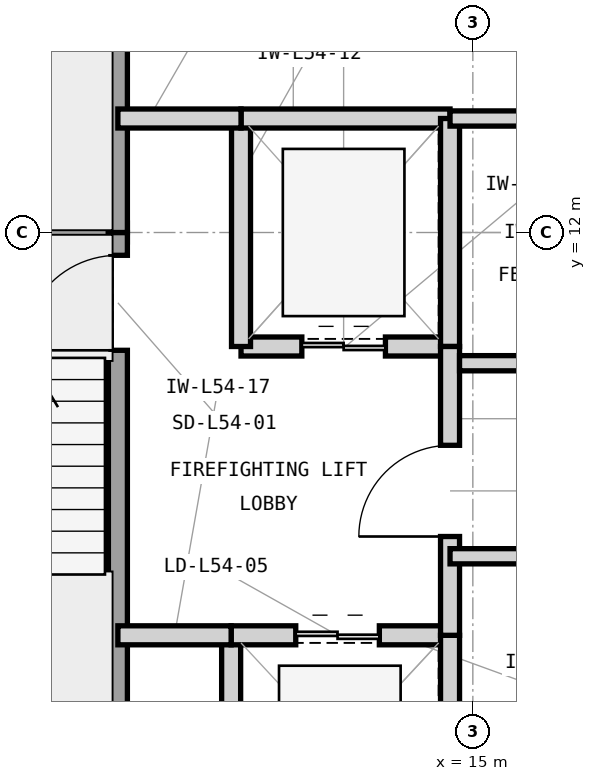
"""IFC4 building model, lengths in metres.
Left out: names, types, materials, properties, quantities, classifications, styles, units other than length and angle.
Written with IfcOpenShell. Run it as: python <this file> out.ifc"""

import sys

from ifc_helpers import new_model, si_unit, direction, frame, frame_2d, origin, place, context, subcontext, project, spatial, rectangle, extrude, element, fill, save


model = new_model("IFC4")
c1 = context("Model", 3, precision=1e-05, world=origin(), true_north=direction((0.0, 1.0)))
c2 = subcontext(c1, "Body", "Model", "MODEL_VIEW")
j1 = project(units=[si_unit("LENGTHUNIT", "METRE"), si_unit("PLANEANGLEUNIT", "RADIAN")], contexts=[c1])
p1 = place(None, origin())
s1 = spatial("IfcSite", under=j1, at=p1, CompositionType="ELEMENT")
p2 = place(p1, origin())
s2 = spatial("IfcBuilding", under=s1, at=p2, CompositionType="ELEMENT")
p3 = place(p2, frame((0.0, 0.0, 222.9)))
s3 = spatial("IfcBuildingStorey", under=s2, at=p3, CompositionType="ELEMENT", Elevation=222.9)
p4 = place(p3, frame((6.35, 12.0, 0.0), z_axis=(0.0, 0.0, 1.0), x_axis=(1.0, 0.0, 0.0)))
e1 = element("IfcWall", 1, at=p4, inside=s3, PredefinedType="SHEAR", context=c2, shape_type="SweptSolid", body=[
    extrude(rectangle(XDim=4.105, YDim=0.25, at=frame_2d((2.052, 0.0))), origin(), (0.0, 0.0, 1.0), 3.9),
])
p5 = place(p3, frame((10.33, 4.55, 0.0), z_axis=(0.0, 0.0, 1.0), x_axis=(0.0, 1.0, 0.0)))
e2 = element("IfcWall", 2, at=p5, inside=s3, PredefinedType="SHEAR", context=c2, shape_type="SweptSolid", body=[
    extrude(rectangle(XDim=7.45, YDim=0.25, at=frame_2d((3.725, 0.0))), origin(), (0.0, 0.0, 1.0), 3.9),
])
p6 = place(p5, frame((5.9, 0.0, 0.0)))
e3 = element("IfcOpeningElement", 3, at=p6, cuts=e2, PredefinedType="OPENING", context=c2, shape_type="SweptSolid", body=[
    extrude(rectangle(XDim=1.25, YDim=2.2, at=frame_2d((0.625, 1.1))), frame((0.0, 0.135, 0.0), z_axis=(0.0, -1.0, 0.0), x_axis=(1.0, 0.0, 0.0)), (0.0, 0.0, 1.0), 0.27),
])
p7 = place(p3, frame((10.33, 12.0, 0.0), z_axis=(0.0, 0.0, 1.0), x_axis=(0.0, 1.0, 0.0)))
e4 = element("IfcWall", 4, at=p7, inside=s3, PredefinedType="SHEAR", context=c2, shape_type="SweptSolid", body=[
    extrude(rectangle(XDim=7.45, YDim=0.25, at=frame_2d((3.725, 0.0))), origin(), (0.0, 0.0, 1.0), 3.9),
])
p8 = place(p7, frame((5.85, 0.0, 0.0)))
e5 = element("IfcOpeningElement", 5, at=p8, cuts=e4, PredefinedType="OPENING", context=c2, shape_type="SweptSolid", body=[
    extrude(rectangle(XDim=1.25, YDim=2.2, at=frame_2d((0.625, 1.1))), frame((0.0, 0.135, 0.0), z_axis=(0.0, -1.0, 0.0), x_axis=(1.0, 0.0, 0.0)), (0.0, 0.0, 1.0), 0.27),
])
p9 = place(p3, frame((11.82, 3.35, 0.0), z_axis=(0.0, 0.0, 1.0), x_axis=(0.0, 1.0, 0.0)))
e6 = element("IfcWall", 6, at=p9, inside=s3, PredefinedType="PARTITIONING", context=c2, shape_type="SweptSolid", body=[
    extrude(rectangle(XDim=3.35, YDim=0.25, at=frame_2d((1.675, 0.0))), origin(), (0.0, 0.0, 1.0), 3.61),
])
p10 = place(p3, frame((11.82, 6.7, 0.0), z_axis=(0.0, 0.0, 1.0), x_axis=(1.0, 0.0, 0.0)))
e7 = element("IfcWall", 7, at=p10, inside=s3, PredefinedType="PARTITIONING", context=c2, shape_type="SweptSolid", body=[
    extrude(rectangle(XDim=2.88, YDim=0.25, at=frame_2d((1.44, 0.0))), origin(), (0.0, 0.0, 1.0), 3.073),
])
p11 = place(p10, frame((0.85, 0.0, 0.0)))
e8 = element("IfcOpeningElement", 8, at=p11, cuts=e7, PredefinedType="OPENING", context=c2, shape_type="SweptSolid", body=[
    extrude(rectangle(XDim=1.1, YDim=2.25, at=frame_2d((0.55, 1.125))), frame((0.0, 0.135, 0.0), z_axis=(0.0, -1.0, 0.0), x_axis=(1.0, 0.0, 0.0)), (0.0, 0.0, 1.0), 0.27),
])
p12 = place(p3, frame((14.7, 3.35, 0.0), z_axis=(0.0, 0.0, 1.0), x_axis=(0.0, 1.0, 0.0)))
e9 = element("IfcWall", 9, at=p12, inside=s3, PredefinedType="PARTITIONING", context=c2, shape_type="SweptSolid", body=[
    extrude(rectangle(XDim=3.35, YDim=0.25, at=frame_2d((1.675, 0.0))), origin(), (0.0, 0.0, 1.0), 3.61),
])
p13 = place(p3, frame((11.95, 10.5, 0.0), z_axis=(0.0, 0.0, 1.0), x_axis=(1.0, 0.0, 0.0)))
e10 = element("IfcWall", 10, at=p13, inside=s3, PredefinedType="PARTITIONING", context=c2, shape_type="SweptSolid", body=[
    extrude(rectangle(XDim=2.75, YDim=0.25, at=frame_2d((1.375, 0.0))), origin(), (0.0, 0.0, 1.0), 3.073),
])
p14 = place(p13, frame((0.8, 0.0, 0.0)))
e11 = element("IfcOpeningElement", 11, at=p14, cuts=e10, PredefinedType="OPENING", context=c2, shape_type="SweptSolid", body=[
    extrude(rectangle(XDim=1.1, YDim=2.25, at=frame_2d((0.55, 1.125))), frame((0.0, 0.135, 0.0), z_axis=(0.0, -1.0, 0.0), x_axis=(1.0, 0.0, 0.0)), (0.0, 0.0, 1.0), 0.27),
])
p15 = place(p3, frame((11.95, 10.5, 0.0), z_axis=(0.0, 0.0, 1.0), x_axis=(0.0, 1.0, 0.0)))
e12 = element("IfcWall", 12, at=p15, inside=s3, PredefinedType="PARTITIONING", context=c2, shape_type="SweptSolid", body=[
    extrude(rectangle(XDim=3.0, YDim=0.25, at=frame_2d((1.5, 0.0))), origin(), (0.0, 0.0, 1.0), 3.61),
])
p16 = place(p3, frame((11.95, 13.5, 0.0), z_axis=(0.0, 0.0, 1.0), x_axis=(1.0, 0.0, 0.0)))
e13 = element("IfcWall", 13, at=p16, inside=s3, PredefinedType="PARTITIONING", context=c2, shape_type="SweptSolid", body=[
    extrude(rectangle(XDim=2.75, YDim=0.25, at=frame_2d((1.375, 0.0))), origin(), (0.0, 0.0, 1.0), 3.073),
])
p17 = place(p3, frame((14.7, 10.5, 0.0), z_axis=(0.0, 0.0, 1.0), x_axis=(0.0, 1.0, 0.0)))
e14 = element("IfcWall", 14, at=p17, inside=s3, PredefinedType="PARTITIONING", context=c2, shape_type="SweptSolid", body=[
    extrude(rectangle(XDim=3.0, YDim=0.25, at=frame_2d((1.5, 0.0))), origin(), (0.0, 0.0, 1.0), 3.61),
])
p18 = place(p3, frame((14.7, 6.7, 0.0), z_axis=(0.0, 0.0, 1.0), x_axis=(0.0, 1.0, 0.0)))
e15 = element("IfcWall", 15, at=p18, inside=s3, PredefinedType="PARTITIONING", context=c2, shape_type="SweptSolid", body=[
    extrude(rectangle(XDim=3.8, YDim=0.25, at=frame_2d((1.9, 0.0))), origin(), (0.0, 0.0, 1.0), 3.61),
])
p19 = place(p18, frame((1.3, 0.0, 0.0)))
e16 = element("IfcOpeningElement", 16, at=p19, cuts=e15, PredefinedType="OPENING", context=c2, shape_type="SweptSolid", body=[
    extrude(rectangle(XDim=1.2, YDim=2.2, at=frame_2d((0.6, 1.1))), frame((0.0, 0.135, 0.0), z_axis=(0.0, -1.0, 0.0), x_axis=(1.0, 0.0, 0.0)), (0.0, 0.0, 1.0), 0.27),
])
p20 = place(p3, frame((10.33, 13.5, 0.0), z_axis=(0.0, 0.0, 1.0), x_axis=(1.0, 0.0, 0.0)))
e17 = element("IfcWall", 17, at=p20, inside=s3, PredefinedType="PARTITIONING", context=c2, shape_type="SweptSolid", body=[
    extrude(rectangle(XDim=1.62, YDim=0.25, at=frame_2d((0.81, 0.0))), origin(), (0.0, 0.0, 1.0), 3.073),
])
p21 = place(p3, frame((10.33, 6.7, 0.0), z_axis=(0.0, 0.0, 1.0), x_axis=(1.0, 0.0, 0.0)))
e18 = element("IfcWall", 18, at=p21, inside=s3, PredefinedType="PARTITIONING", context=c2, shape_type="SweptSolid", body=[
    extrude(rectangle(XDim=1.49, YDim=0.25, at=frame_2d((0.745, 0.0))), origin(), (0.0, 0.0, 1.0), 3.073),
])
p22 = place(p3, frame((14.7, 7.74, 0.0), z_axis=(0.0, 0.0, 1.0), x_axis=(1.0, 0.0, 0.0)))
e19 = element("IfcWall", 19, at=p22, inside=s3, PredefinedType="PARTITIONING", context=c2, shape_type="SweptSolid", body=[
    extrude(rectangle(XDim=2.95, YDim=0.2, at=frame_2d((1.475, 0.0))), origin(), (0.0, 0.0, 1.0), 3.61),
])
p23 = place(p22, frame((1.025, 0.0, 0.0)))
e20 = element("IfcOpeningElement", 20, at=p23, cuts=e19, PredefinedType="OPENING", context=c2, shape_type="SweptSolid", body=[
    extrude(rectangle(XDim=0.9, YDim=2.1, at=frame_2d((0.45, 1.05))), frame((0.0, 0.11, 0.0), z_axis=(0.0, -1.0, 0.0), x_axis=(1.0, 0.0, 0.0)), (0.0, 0.0, 1.0), 0.22),
])
p24 = place(p3, frame((14.825, 10.28, 0.0), z_axis=(0.0, 0.0, 1.0), x_axis=(1.0, 0.0, 0.0)))
e21 = element("IfcWall", 21, at=p24, inside=s3, PredefinedType="PARTITIONING", context=c2, shape_type="SweptSolid", body=[
    extrude(rectangle(XDim=8.825, YDim=0.2, at=frame_2d((4.413, 0.0))), origin(), (0.0, 0.0, 1.0), 3.61),
])
p25 = place(p3, frame((14.7, 13.5, 0.0), z_axis=(0.0, 0.0, 1.0), x_axis=(1.0, 0.0, 0.0)))
e22 = element("IfcWall", 22, at=p25, inside=s3, PredefinedType="PARTITIONING", context=c2, shape_type="SweptSolid", body=[
    extrude(rectangle(XDim=3.75, YDim=0.2, at=frame_2d((1.875, 0.0))), origin(), (0.0, 0.0, 1.0), 3.073),
])
p26 = place(p25, frame((1.4, 0.0, 0.0)))
e23 = element("IfcOpeningElement", 23, at=p26, cuts=e22, PredefinedType="OPENING", context=c2, shape_type="SweptSolid", body=[
    extrude(rectangle(XDim=0.95, YDim=2.1, at=frame_2d((0.475, 1.05))), frame((0.0, 0.11, 0.0), z_axis=(0.0, -1.0, 0.0), x_axis=(1.0, 0.0, 0.0)), (0.0, 0.0, 1.0), 0.22),
])
p27 = place(p6, origin())
e24 = element("IfcDoor", 24, at=p27, inside=s3, OperationType="SINGLE_SWING_LEFT", PredefinedType="DOOR", context=c2, shape_type="SweptSolid", body=[
    extrude(rectangle(XDim=1.25, YDim=2.2, at=frame_2d((0.625, 1.1))), frame((0.0, 0.025, 0.0), z_axis=(0.0, -1.0, 0.0), x_axis=(1.0, 0.0, 0.0)), (0.0, 0.0, 1.0), 0.05),
])
fill(e3, e24)
p28 = place(p11, origin())
e25 = element("IfcDoor", 25, at=p28, inside=s3, OperationType="DOUBLE_DOOR_SLIDING", PredefinedType="DOOR", context=c2, shape_type="SweptSolid", body=[
    extrude(rectangle(XDim=1.1, YDim=2.25, at=frame_2d((0.55, 1.125))), frame((0.0, 0.025, 0.0), z_axis=(0.0, -1.0, 0.0), x_axis=(1.0, 0.0, 0.0)), (0.0, 0.0, 1.0), 0.05),
])
fill(e8, e25)
p29 = place(p14, origin())
e26 = element("IfcDoor", 26, at=p29, inside=s3, OperationType="DOUBLE_DOOR_SLIDING", PredefinedType="DOOR", context=c2, shape_type="SweptSolid", body=[
    extrude(rectangle(XDim=1.1, YDim=2.25, at=frame_2d((0.55, 1.125))), frame((0.0, 0.025, 0.0), z_axis=(0.0, -1.0, 0.0), x_axis=(1.0, 0.0, 0.0)), (0.0, 0.0, 1.0), 0.05),
])
fill(e11, e26)
p30 = place(p19, origin())
e27 = element("IfcDoor", 27, at=p30, inside=s3, OperationType="SINGLE_SWING_LEFT", PredefinedType="DOOR", context=c2, shape_type="SweptSolid", body=[
    extrude(rectangle(XDim=1.2, YDim=2.2, at=frame_2d((0.6, 1.1))), frame((0.0, 0.025, 0.0), z_axis=(0.0, -1.0, 0.0), x_axis=(1.0, 0.0, 0.0)), (0.0, 0.0, 1.0), 0.05),
])
fill(e16, e27)
save(model, sys.argv[1])
